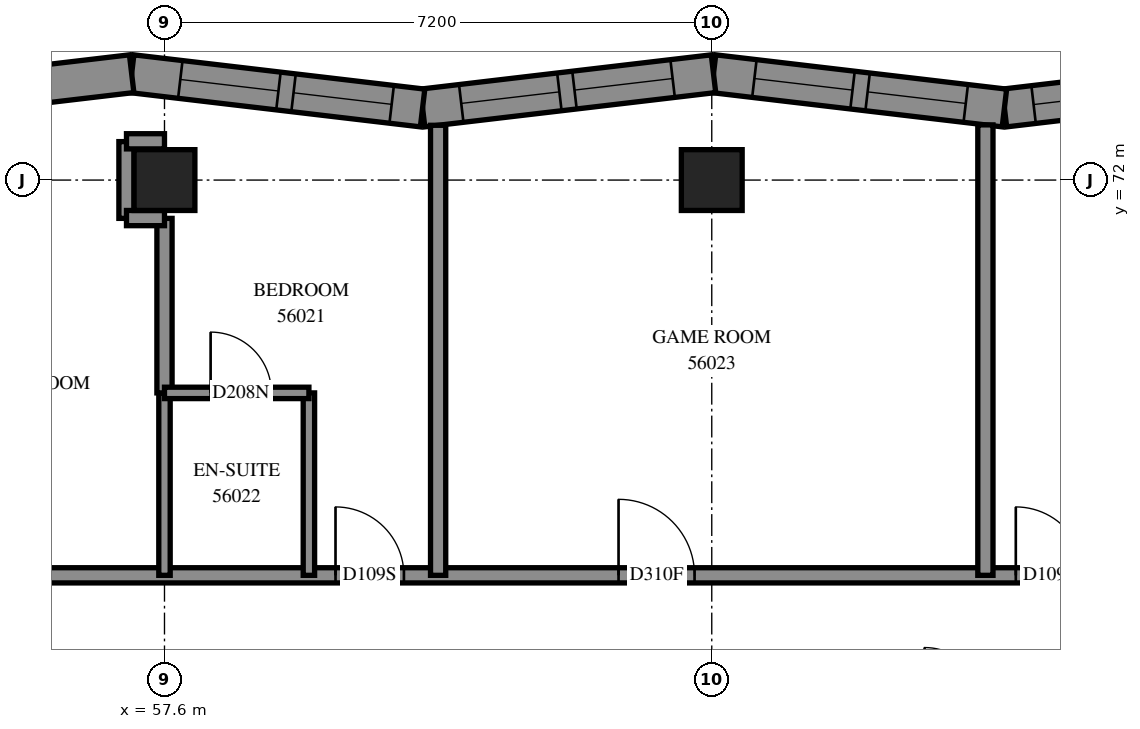
"""IFC4 building model, lengths in metres.
Left out: names, types, materials, properties, quantities, classifications, styles, units other than length and angle.
Written with IfcOpenShell. Run it as: python <this file> out.ifc"""

import sys

from ifc_helpers import new_model, si_unit, direction, frame, frame_2d, origin, origin_2d, place, context, subcontext, project, spatial, polyline, rectangle, outline, extrude, element, fill, save


model = new_model("IFC4")
c1 = context("Model", 3, precision=1e-05, world=origin(), true_north=direction((0.0, 1.0)))
c2 = subcontext(c1, "Body", "Model", "MODEL_VIEW")
j1 = project(units=[si_unit("LENGTHUNIT", "METRE"), si_unit("PLANEANGLEUNIT", "RADIAN")], contexts=[c1])
p1 = place(None, origin())
s1 = spatial("IfcSite", under=j1, at=p1, CompositionType="ELEMENT")
p2 = place(p1, origin())
s2 = spatial("IfcBuilding", under=s1, at=p2, CompositionType="ELEMENT")
p3 = place(p2, frame((0.0, 0.0, 206.6)))
s3 = spatial("IfcBuildingStorey", under=s2, at=p3, CompositionType="ELEMENT", Elevation=206.6)
for number, where, z_axis, x_axis in (
    (1, (57.6, 72.0, 0.0), (0.0, 0.0, 1.0), (1.0, 0.0, 0.0)),
    (2, (64.8, 72.0, 0.0), (0.0, 0.0, 1.0), (1.0, 0.0, 0.0)),
):
    element("IfcColumn", number, at=place(p3, frame(where, z_axis=z_axis, x_axis=x_axis)), inside=s3, PredefinedType="COLUMN", context=c2, shape_type="SweptSolid", body=[
        extrude(rectangle(XDim=0.8, YDim=0.8, at=origin_2d()), origin(), (0.0, 0.0, 1.0), 3.1),
    ])
p4 = place(p3, frame((72.478, 73.399, 0.0), z_axis=(0.0, 0.0, 1.0), x_axis=(-0.9931289789, -0.1170249176, 0.0)))
e3 = element("IfcWall", 3, at=p4, inside=s3, PredefinedType="SOLIDWALL", context=c2, shape_type="SweptSolid", body=[
    extrude(outline(polyline([(-0.029, -0.25), (3.824, -0.25), (3.883, 0.25), (0.029, 0.25), (-0.029, -0.25)])), origin(), (0.0, 0.0, 1.0), 3.1),
])
p5 = place(p4, frame((0.667, 0.0, 0.45)))
e4 = element("IfcOpeningElement", 4, at=p5, cuts=e3, PredefinedType="OPENING", context=c2, shape_type="SweptSolid", body=[
    extrude(rectangle(XDim=1.3, YDim=2.5, at=frame_2d((0.65, 1.25))), frame((0.0, 0.26, 0.0), z_axis=(0.0, -1.0, 0.0), x_axis=(1.0, 0.0, 0.0)), (0.0, 0.0, 1.0), 0.52),
])
p6 = place(p4, frame((2.167, 0.0, 0.45)))
e5 = element("IfcOpeningElement", 5, at=p6, cuts=e3, PredefinedType="OPENING", context=c2, shape_type="SweptSolid", body=[
    extrude(rectangle(XDim=1.3, YDim=2.5, at=frame_2d((0.65, 1.25))), frame((0.0, 0.26, 0.0), z_axis=(0.0, -1.0, 0.0), x_axis=(1.0, 0.0, 0.0)), (0.0, 0.0, 1.0), 0.52),
])
p7 = place(p3, frame((68.65, 72.948, 0.0), z_axis=(0.0, 0.0, 1.0), x_axis=(-0.9931289789, 0.1170249176, 0.0)))
e6 = element("IfcWall", 6, at=p7, inside=s3, PredefinedType="SOLIDWALL", context=c2, shape_type="SweptSolid", body=[
    extrude(outline(polyline([(0.029, -0.25), (3.883, -0.25), (3.824, 0.25), (-0.029, 0.25), (0.029, -0.25)])), origin(), (0.0, 0.0, 1.0), 3.1),
])
p8 = place(p7, frame((0.512, 0.0, 0.45)))
e7 = element("IfcOpeningElement", 7, at=p8, cuts=e6, PredefinedType="OPENING", context=c2, shape_type="SweptSolid", body=[
    extrude(rectangle(XDim=1.3, YDim=2.5, at=frame_2d((0.65, 1.25))), frame((0.0, 0.26, 0.0), z_axis=(0.0, -1.0, 0.0), x_axis=(1.0, 0.0, 0.0)), (0.0, 0.0, 1.0), 0.52),
])
p9 = place(p7, frame((2.012, 0.0, 0.45)))
e8 = element("IfcOpeningElement", 8, at=p9, cuts=e6, PredefinedType="OPENING", context=c2, shape_type="SweptSolid", body=[
    extrude(rectangle(XDim=1.3, YDim=2.5, at=frame_2d((0.65, 1.25))), frame((0.0, 0.26, 0.0), z_axis=(0.0, -1.0, 0.0), x_axis=(1.0, 0.0, 0.0)), (0.0, 0.0, 1.0), 0.52),
])
p10 = place(p3, frame((64.823, 73.399, 0.0), z_axis=(0.0, 0.0, 1.0), x_axis=(-0.9931289789, -0.1170249176, 0.0)))
e9 = element("IfcWall", 9, at=p10, inside=s3, PredefinedType="SOLIDWALL", context=c2, shape_type="SweptSolid", body=[
    extrude(outline(polyline([(-0.029, -0.25), (3.824, -0.25), (3.883, 0.25), (0.029, 0.25), (-0.029, -0.25)])), origin(), (0.0, 0.0, 1.0), 3.1),
])
p11 = place(p10, frame((0.542, 0.0, 0.45)))
e10 = element("IfcOpeningElement", 10, at=p11, cuts=e9, PredefinedType="OPENING", context=c2, shape_type="SweptSolid", body=[
    extrude(rectangle(XDim=1.3, YDim=2.5, at=frame_2d((0.65, 1.25))), frame((0.0, 0.26, 0.0), z_axis=(0.0, -1.0, 0.0), x_axis=(1.0, 0.0, 0.0)), (0.0, 0.0, 1.0), 0.52),
])
p12 = place(p10, frame((2.042, 0.0, 0.45)))
e11 = element("IfcOpeningElement", 11, at=p12, cuts=e9, PredefinedType="OPENING", context=c2, shape_type="SweptSolid", body=[
    extrude(rectangle(XDim=1.3, YDim=2.5, at=frame_2d((0.65, 1.25))), frame((0.0, 0.26, 0.0), z_axis=(0.0, -1.0, 0.0), x_axis=(1.0, 0.0, 0.0)), (0.0, 0.0, 1.0), 0.52),
])
p13 = place(p3, frame((60.995, 72.948, 0.0), z_axis=(0.0, 0.0, 1.0), x_axis=(-0.9931289789, 0.1170249176, 0.0)))
e12 = element("IfcWall", 12, at=p13, inside=s3, PredefinedType="SOLIDWALL", context=c2, shape_type="SweptSolid", body=[
    extrude(outline(polyline([(0.029, -0.25), (3.883, -0.25), (3.824, 0.25), (-0.029, 0.25), (0.029, -0.25)])), origin(), (0.0, 0.0, 1.0), 3.1),
])
p14 = place(p13, frame((0.409, 0.0, 0.45)))
e13 = element("IfcOpeningElement", 13, at=p14, cuts=e12, PredefinedType="OPENING", context=c2, shape_type="SweptSolid", body=[
    extrude(rectangle(XDim=1.3, YDim=2.5, at=frame_2d((0.65, 1.25))), frame((0.0, 0.26, 0.0), z_axis=(0.0, -1.0, 0.0), x_axis=(1.0, 0.0, 0.0)), (0.0, 0.0, 1.0), 0.52),
])
p15 = place(p13, frame((1.909, 0.0, 0.45)))
e14 = element("IfcOpeningElement", 14, at=p15, cuts=e12, PredefinedType="OPENING", context=c2, shape_type="SweptSolid", body=[
    extrude(rectangle(XDim=1.3, YDim=2.5, at=frame_2d((0.65, 1.25))), frame((0.0, 0.26, 0.0), z_axis=(0.0, -1.0, 0.0), x_axis=(1.0, 0.0, 0.0)), (0.0, 0.0, 1.0), 0.52),
])
p16 = place(p3, frame((57.168, 73.399, 0.0), z_axis=(0.0, 0.0, 1.0), x_axis=(-0.9931289789, -0.1170249176, 0.0)))
e15 = element("IfcWall", 15, at=p16, inside=s3, PredefinedType="SOLIDWALL", context=c2, shape_type="SweptSolid", body=[
    extrude(outline(polyline([(-0.029, -0.25), (3.824, -0.25), (3.883, 0.25), (0.029, 0.25), (-0.029, -0.25)])), origin(), (0.0, 0.0, 1.0), 3.1),
])
p17 = place(p16, frame((1.11, 0.0, 0.45)))
e16 = element("IfcOpeningElement", 16, at=p17, cuts=e15, PredefinedType="OPENING", context=c2, shape_type="SweptSolid", body=[
    extrude(rectangle(XDim=1.2, YDim=2.5, at=frame_2d((0.6, 1.25))), frame((0.0, 0.26, 0.0), z_axis=(0.0, -1.0, 0.0), x_axis=(1.0, 0.0, 0.0)), (0.0, 0.0, 1.0), 0.52),
])
p18 = place(p3, frame((55.6, 66.8, 0.0), z_axis=(0.0, 0.0, 1.0), x_axis=(1.0, 0.0, 0.0)))
e17 = element("IfcWall", 17, at=p18, inside=s3, PredefinedType="PARTITIONING", context=c2, shape_type="SweptSolid", body=[
    extrude(rectangle(XDim=18.4, YDim=0.2, at=frame_2d((9.2, 0.0))), origin(), (0.0, 0.0, 1.0), 3.1),
])
p19 = place(p18, frame((4.25, 0.0, 0.0)))
e18 = element("IfcOpeningElement", 18, at=p19, cuts=e17, PredefinedType="OPENING", context=c2, shape_type="SweptSolid", body=[
    extrude(rectangle(XDim=0.9, YDim=2.1, at=frame_2d((0.45, 1.05))), frame((0.0, 0.11, 0.0), z_axis=(0.0, -1.0, 0.0), x_axis=(1.0, 0.0, 0.0)), (0.0, 0.0, 1.0), 0.22),
])
p20 = place(p18, frame((7.974, 0.0, 0.0)))
e19 = element("IfcOpeningElement", 19, at=p20, cuts=e17, PredefinedType="OPENING", context=c2, shape_type="SweptSolid", body=[
    extrude(rectangle(XDim=1.0, YDim=2.1, at=frame_2d((0.5, 1.05))), frame((0.0, 0.11, 0.0), z_axis=(0.0, -1.0, 0.0), x_axis=(1.0, 0.0, 0.0)), (0.0, 0.0, 1.0), 0.22),
])
p21 = place(p18, frame((13.2, 0.0, 0.0)))
e20 = element("IfcOpeningElement", 20, at=p21, cuts=e17, PredefinedType="OPENING", context=c2, shape_type="SweptSolid", body=[
    extrude(rectangle(XDim=0.9, YDim=2.1, at=frame_2d((0.45, 1.05))), frame((0.0, 0.11, 0.0), z_axis=(0.0, -1.0, 0.0), x_axis=(1.0, 0.0, 0.0)), (0.0, 0.0, 1.0), 0.22),
])
p22 = place(p3, frame((68.4, 66.8, 0.0), z_axis=(0.0, 0.0, 1.0), x_axis=(0.0, 1.0, 0.0)))
e21 = element("IfcWall", 21, at=p22, inside=s3, PredefinedType="PARTITIONING", context=c2, shape_type="SweptSolid", body=[
    extrude(rectangle(XDim=5.926, YDim=0.2, at=frame_2d((2.963, 0.0))), origin(), (0.0, 0.0, 1.0), 3.1),
])
p23 = place(p3, frame((61.2, 66.8, 0.0), z_axis=(0.0, 0.0, 1.0), x_axis=(0.0, 1.0, 0.0)))
e22 = element("IfcWall", 22, at=p23, inside=s3, PredefinedType="PARTITIONING", context=c2, shape_type="SweptSolid", body=[
    extrude(rectangle(XDim=5.921, YDim=0.2, at=frame_2d((2.96, 0.0))), origin(), (0.0, 0.0, 1.0), 3.1),
])
for number, where, z_axis, x_axis in (
    (23, (57.6, 66.8, 0.0), (0.0, 0.0, 1.0), (0.0, 1.0, 0.0)),
    (24, (59.5, 66.8, 0.0), (0.0, 0.0, 1.0), (0.0, 1.0, 0.0)),
):
    element("IfcWall", number, at=place(p3, frame(where, z_axis=z_axis, x_axis=x_axis)), inside=s3, PredefinedType="PARTITIONING", context=c2, shape_type="SweptSolid", body=[
        extrude(rectangle(XDim=2.4, YDim=0.15, at=frame_2d((1.2, 0.0))), origin(), (0.0, 0.0, 1.0), 3.1),
    ])
p24 = place(p3, frame((57.6, 69.2, 0.0), z_axis=(0.0, 0.0, 1.0), x_axis=(0.0, 1.0, 0.0)))
e25 = element("IfcWall", 25, at=p24, inside=s3, PredefinedType="PARTITIONING", context=c2, shape_type="SweptSolid", body=[
    extrude(rectangle(XDim=2.296, YDim=0.2, at=frame_2d((1.148, 0.0))), origin(), (0.0, 0.0, 1.0), 3.1),
])
p25 = place(p3, frame((57.6, 69.2, 0.0), z_axis=(0.0, 0.0, 1.0), x_axis=(1.0, 0.0, 0.0)))
e26 = element("IfcWall", 26, at=p25, inside=s3, PredefinedType="PARTITIONING", context=c2, shape_type="SweptSolid", body=[
    extrude(rectangle(XDim=1.9, YDim=0.15, at=frame_2d((0.95, 0.0))), origin(), (0.0, 0.0, 1.0), 3.1),
])
p26 = place(p25, frame((0.607, 0.0, 0.0)))
e27 = element("IfcOpeningElement", 27, at=p26, cuts=e26, PredefinedType="OPENING", context=c2, shape_type="SweptSolid", body=[
    extrude(rectangle(XDim=0.8, YDim=2.1, at=frame_2d((0.4, 1.05))), frame((0.0, 0.085, 0.0), z_axis=(0.0, -1.0, 0.0), x_axis=(1.0, 0.0, 0.0)), (0.0, 0.0, 1.0), 0.17),
])
p27 = place(p3, frame((57.1, 71.496, 0.0), z_axis=(0.0, 0.0, 1.0), x_axis=(0.0, 1.0, 0.0)))
e28 = element("IfcWall", 28, at=p27, inside=s3, PredefinedType="PARTITIONING", context=c2, shape_type="SweptSolid", body=[
    extrude(rectangle(XDim=1.01, YDim=0.2, at=frame_2d((0.505, 0.0))), origin(), (0.0, 0.0, 1.0), 3.1),
])
for number, where, z_axis, x_axis in (
    (29, (57.1, 72.51, 0.0), (0.0, 0.0, 1.0), (1.0, 0.0, 0.0)),
    (30, (57.1, 71.5, 0.0), (0.0, 0.0, 1.0), (1.0, 0.0, 0.0)),
):
    element("IfcWall", number, at=place(p3, frame(where, z_axis=z_axis, x_axis=x_axis)), inside=s3, PredefinedType="PARTITIONING", context=c2, shape_type="SweptSolid", body=[
        extrude(rectangle(XDim=0.5, YDim=0.2, at=frame_2d((0.25, 0.0))), origin(), (0.0, 0.0, 1.0), 3.1),
    ])
p28 = place(p6, origin())
e31 = element("IfcWindow", 31, at=p28, inside=s3, PartitioningType="SINGLE_PANEL", PredefinedType="WINDOW", context=c2, shape_type="SweptSolid", body=[
    extrude(rectangle(XDim=1.3, YDim=2.5, at=frame_2d((0.65, 1.25))), frame((0.0, 0.18, 0.0), z_axis=(0.0, -1.0, 0.0), x_axis=(1.0, 0.0, 0.0)), (0.0, 0.0, 1.0), 0.06),
])
fill(e5, e31)
p29 = place(p8, origin())
e32 = element("IfcWindow", 32, at=p29, inside=s3, PartitioningType="SINGLE_PANEL", PredefinedType="WINDOW", context=c2, shape_type="SweptSolid", body=[
    extrude(rectangle(XDim=1.3, YDim=2.5, at=frame_2d((0.65, 1.25))), frame((0.0, 0.18, 0.0), z_axis=(0.0, -1.0, 0.0), x_axis=(1.0, 0.0, 0.0)), (0.0, 0.0, 1.0), 0.06),
])
fill(e7, e32)
p30 = place(p9, origin())
e33 = element("IfcWindow", 33, at=p30, inside=s3, PartitioningType="SINGLE_PANEL", PredefinedType="WINDOW", context=c2, shape_type="SweptSolid", body=[
    extrude(rectangle(XDim=1.3, YDim=2.5, at=frame_2d((0.65, 1.25))), frame((0.0, 0.18, 0.0), z_axis=(0.0, -1.0, 0.0), x_axis=(1.0, 0.0, 0.0)), (0.0, 0.0, 1.0), 0.06),
])
fill(e8, e33)
p31 = place(p11, origin())
e34 = element("IfcWindow", 34, at=p31, inside=s3, PartitioningType="SINGLE_PANEL", PredefinedType="WINDOW", context=c2, shape_type="SweptSolid", body=[
    extrude(rectangle(XDim=1.3, YDim=2.5, at=frame_2d((0.65, 1.25))), frame((0.0, 0.18, 0.0), z_axis=(0.0, -1.0, 0.0), x_axis=(1.0, 0.0, 0.0)), (0.0, 0.0, 1.0), 0.06),
])
fill(e10, e34)
p32 = place(p12, origin())
e35 = element("IfcWindow", 35, at=p32, inside=s3, PartitioningType="SINGLE_PANEL", PredefinedType="WINDOW", context=c2, shape_type="SweptSolid", body=[
    extrude(rectangle(XDim=1.3, YDim=2.5, at=frame_2d((0.65, 1.25))), frame((0.0, 0.18, 0.0), z_axis=(0.0, -1.0, 0.0), x_axis=(1.0, 0.0, 0.0)), (0.0, 0.0, 1.0), 0.06),
])
fill(e11, e35)
p33 = place(p14, origin())
e36 = element("IfcWindow", 36, at=p33, inside=s3, PartitioningType="SINGLE_PANEL", PredefinedType="WINDOW", context=c2, shape_type="SweptSolid", body=[
    extrude(rectangle(XDim=1.3, YDim=2.5, at=frame_2d((0.65, 1.25))), frame((0.0, 0.18, 0.0), z_axis=(0.0, -1.0, 0.0), x_axis=(1.0, 0.0, 0.0)), (0.0, 0.0, 1.0), 0.06),
])
fill(e13, e36)
p34 = place(p15, origin())
e37 = element("IfcWindow", 37, at=p34, inside=s3, PartitioningType="SINGLE_PANEL", PredefinedType="WINDOW", context=c2, shape_type="SweptSolid", body=[
    extrude(rectangle(XDim=1.3, YDim=2.5, at=frame_2d((0.65, 1.25))), frame((0.0, 0.18, 0.0), z_axis=(0.0, -1.0, 0.0), x_axis=(1.0, 0.0, 0.0)), (0.0, 0.0, 1.0), 0.06),
])
fill(e14, e37)
p35 = place(p19, origin())
e38 = element("IfcDoor", 38, at=p35, inside=s3, OperationType="SINGLE_SWING_RIGHT", PredefinedType="DOOR", context=c2, shape_type="SweptSolid", body=[
    extrude(rectangle(XDim=0.9, YDim=2.1, at=frame_2d((0.45, 1.05))), frame((0.0, 0.025, 0.0), z_axis=(0.0, -1.0, 0.0), x_axis=(1.0, 0.0, 0.0)), (0.0, 0.0, 1.0), 0.05),
])
fill(e18, e38)
p36 = place(p26, origin())
e39 = element("IfcDoor", 39, at=p36, inside=s3, OperationType="SINGLE_SWING_RIGHT", PredefinedType="DOOR", context=c2, shape_type="SweptSolid", body=[
    extrude(rectangle(XDim=0.8, YDim=2.1, at=frame_2d((0.4, 1.05))), frame((0.0, 0.025, 0.0), z_axis=(0.0, -1.0, 0.0), x_axis=(1.0, 0.0, 0.0)), (0.0, 0.0, 1.0), 0.05),
])
fill(e27, e39)
p37 = place(p20, origin())
e40 = element("IfcDoor", 40, at=p37, inside=s3, OperationType="SINGLE_SWING_LEFT", PredefinedType="DOOR", context=c2, shape_type="SweptSolid", body=[
    extrude(rectangle(XDim=1.0, YDim=2.1, at=frame_2d((0.5, 1.05))), frame((0.0, 0.025, 0.0), z_axis=(0.0, -1.0, 0.0), x_axis=(1.0, 0.0, 0.0)), (0.0, 0.0, 1.0), 0.05),
])
fill(e19, e40)
p38 = place(p21, origin())
e41 = element("IfcDoor", 41, at=p38, inside=s3, OperationType="SINGLE_SWING_LEFT", PredefinedType="DOOR", context=c2, shape_type="SweptSolid", body=[
    extrude(rectangle(XDim=0.9, YDim=2.1, at=frame_2d((0.45, 1.05))), frame((0.0, 0.025, 0.0), z_axis=(0.0, -1.0, 0.0), x_axis=(1.0, 0.0, 0.0)), (0.0, 0.0, 1.0), 0.05),
])
fill(e20, e41)
save(model, sys.argv[1])
